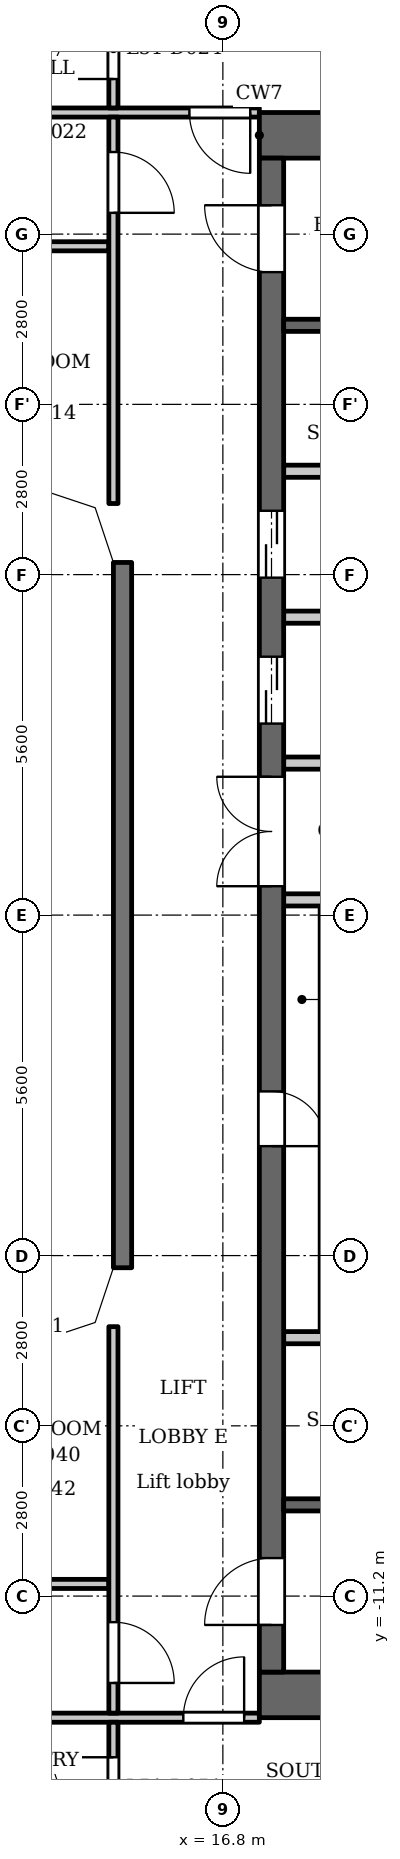
"""IFC4 building model, lengths in metres.
Left out: names, types, materials, properties, quantities, classifications, styles, units other than length and angle.
Written with IfcOpenShell. Run it as: python <this file> out.ifc"""

import sys

from ifc_helpers import new_model, si_unit, direction, frame, frame_2d, origin, place, context, subcontext, project, spatial, polyline, rectangle, outline, extrude, element, fill, save


model = new_model("IFC4")
c1 = context("Model", 3, precision=1e-05, world=origin(), true_north=direction((0.0, 1.0)))
c2 = subcontext(c1, "Body", "Model", "MODEL_VIEW")
j1 = project(units=[si_unit("LENGTHUNIT", "METRE"), si_unit("PLANEANGLEUNIT", "RADIAN")], contexts=[c1])
p1 = place(None, origin())
s1 = spatial("IfcSite", under=j1, at=p1, CompositionType="ELEMENT")
p2 = place(p1, origin())
s2 = spatial("IfcBuilding", under=s1, at=p2, CompositionType="ELEMENT")
p3 = place(p2, frame((0.0, 0.0, 199.4)))
s3 = spatial("IfcBuildingStorey", under=s2, at=p3, CompositionType="ELEMENT", Elevation=199.4)
p4 = place(p3, frame((15.15, 5.8, 0.0), z_axis=(0.0, 0.0, 1.0), x_axis=(0.0, -1.0, 0.0)))
e1 = element("IfcWall", 1, at=p4, inside=s3, PredefinedType="SOLIDWALL", context=c2, shape_type="SweptSolid", body=[
    extrude(rectangle(XDim=11.6, YDim=0.3, at=frame_2d((5.8, 0.0))), origin(), (0.0, 0.0, 1.0), 3.2),
])
for number, where, z_axis, x_axis in (
    (2, (17.4, 12.825, 0.0), (0.0, 0.0, 1.0), (1.0, 0.0, 0.0)),
    (3, (17.4, -12.825, 0.0), (0.0, 0.0, 1.0), (1.0, 0.0, 0.0)),
):
    element("IfcWall", number, at=place(p3, frame(where, z_axis=z_axis, x_axis=x_axis)), inside=s3, PredefinedType="SHEAR", context=c2, shape_type="SweptSolid", body=[
        extrude(rectangle(XDim=7.6, YDim=0.75, at=frame_2d((3.8, 0.0))), origin(), (0.0, 0.0, 1.0), 3.2),
    ])
p5 = place(p3, frame((17.6, -12.45, 0.0), z_axis=(0.0, 0.0, 1.0), x_axis=(0.0, 1.0, 0.0)))
e4 = element("IfcWall", 4, at=p5, inside=s3, PredefinedType="SHEAR", context=c2, shape_type="SweptSolid", body=[
    extrude(rectangle(XDim=24.9, YDim=0.4, at=frame_2d((12.45, 0.0))), origin(), (0.0, 0.0, 1.0), 3.2),
])
p6 = place(p5, frame((8.65, 0.0, 0.0)))
e5 = element("IfcOpeningElement", 5, at=p6, cuts=e4, PredefinedType="OPENING", context=c2, shape_type="SweptSolid", body=[
    extrude(rectangle(XDim=0.9, YDim=2.1, at=frame_2d((0.45, 1.05))), frame((0.0, 0.21, 0.0), z_axis=(0.0, -1.0, 0.0), x_axis=(1.0, 0.0, 0.0)), (0.0, 0.0, 1.0), 0.42),
])
p7 = place(p5, frame((15.6, 0.0, 0.0)))
e6 = element("IfcOpeningElement", 6, at=p7, cuts=e4, PredefinedType="OPENING", context=c2, shape_type="SweptSolid", body=[
    extrude(rectangle(XDim=1.1, YDim=2.1, at=frame_2d((0.55, 1.05))), frame((0.0, 0.21, 0.0), z_axis=(0.0, -1.0, 0.0), x_axis=(1.0, 0.0, 0.0)), (0.0, 0.0, 1.0), 0.42),
])
p8 = place(p5, frame((18.0, 0.0, 0.0)))
e7 = element("IfcOpeningElement", 7, at=p8, cuts=e4, PredefinedType="OPENING", context=c2, shape_type="SweptSolid", body=[
    extrude(rectangle(XDim=1.1, YDim=2.1, at=frame_2d((0.55, 1.05))), frame((0.0, 0.21, 0.0), z_axis=(0.0, -1.0, 0.0), x_axis=(1.0, 0.0, 0.0)), (0.0, 0.0, 1.0), 0.42),
])
p9 = place(p5, frame((23.025, 0.0, 0.0)))
e8 = element("IfcOpeningElement", 8, at=p9, cuts=e4, PredefinedType="OPENING", context=c2, shape_type="SweptSolid", body=[
    extrude(rectangle(XDim=1.1, YDim=2.1, at=frame_2d((0.55, 1.05))), frame((0.0, 0.21, 0.0), z_axis=(0.0, -1.0, 0.0), x_axis=(1.0, 0.0, 0.0)), (0.0, 0.0, 1.0), 0.42),
])
p10 = place(p5, frame((0.775, 0.0, 0.0)))
e9 = element("IfcOpeningElement", 9, at=p10, cuts=e4, PredefinedType="OPENING", context=c2, shape_type="SweptSolid", body=[
    extrude(rectangle(XDim=1.1, YDim=2.1, at=frame_2d((0.55, 1.05))), frame((0.0, 0.21, 0.0), z_axis=(0.0, -1.0, 0.0), x_axis=(1.0, 0.0, 0.0)), (0.0, 0.0, 1.0), 0.42),
])
p11 = place(p5, frame((12.925, 0.0, 0.0)))
e10 = element("IfcOpeningElement", 10, at=p11, cuts=e4, PredefinedType="OPENING", context=c2, shape_type="SweptSolid", body=[
    extrude(rectangle(XDim=1.8, YDim=2.1, at=frame_2d((0.9, 1.05))), frame((0.0, 0.21, 0.0), z_axis=(0.0, -1.0, 0.0), x_axis=(1.0, 0.0, 0.0)), (0.0, 0.0, 1.0), 0.42),
])
p12 = place(p3, frame((17.8, -9.7, 0.0), z_axis=(0.0, 0.0, 1.0), x_axis=(1.0, 0.0, 0.0)))
e11 = element("IfcWall", 11, at=p12, inside=s3, PredefinedType="SHEAR", context=c2, shape_type="SweptSolid", body=[
    extrude(rectangle(XDim=5.65, YDim=0.2, at=frame_2d((2.825, 0.0))), origin(), (0.0, 0.0, 1.0), 3.2),
])
p13 = place(p12, frame((0.85, 0.0, 0.0)))
e12 = element("IfcOpeningElement", 12, at=p13, cuts=e11, PredefinedType="OPENING", context=c2, shape_type="SweptSolid", body=[
    extrude(rectangle(XDim=1.1, YDim=2.1, at=frame_2d((0.55, 1.05))), frame((0.0, 0.11, 0.0), z_axis=(0.0, -1.0, 0.0), x_axis=(1.0, 0.0, 0.0)), (0.0, 0.0, 1.0), 0.22),
])
p14 = place(p12, frame((3.75, 0.0, 0.0)))
e13 = element("IfcOpeningElement", 13, at=p14, cuts=e11, PredefinedType="OPENING", context=c2, shape_type="SweptSolid", body=[
    extrude(rectangle(XDim=1.1, YDim=2.1, at=frame_2d((0.55, 1.05))), frame((0.0, 0.11, 0.0), z_axis=(0.0, -1.0, 0.0), x_axis=(1.0, 0.0, 0.0)), (0.0, 0.0, 1.0), 0.22),
])
p15 = place(p3, frame((17.8, -6.95, 0.0), z_axis=(0.0, 0.0, 1.0), x_axis=(1.0, 0.0, 0.0)))
e14 = element("IfcWall", 14, at=p15, inside=s3, PredefinedType="PARTITIONING", context=c2, shape_type="SweptSolid", body=[
    extrude(rectangle(XDim=2.8, YDim=0.2, at=frame_2d((1.4, 0.0))), origin(), (0.0, 0.0, 1.0), 3.2),
])
p16 = place(p3, frame((17.8, 0.25, 0.0), z_axis=(0.0, 0.0, 1.0), x_axis=(1.0, 0.0, 0.0)))
e15 = element("IfcWall", 15, at=p16, inside=s3, PredefinedType="PARTITIONING", context=c2, shape_type="SweptSolid", body=[
    extrude(rectangle(XDim=3.0, YDim=0.2, at=frame_2d((1.5, 0.0))), origin(), (0.0, 0.0, 1.0), 3.2),
])
p17 = place(p16, frame((1.35, 0.0, 0.0)))
e16 = element("IfcOpeningElement", 16, at=p17, cuts=e15, PredefinedType="OPENING", context=c2, shape_type="SweptSolid", body=[
    extrude(rectangle(XDim=0.9, YDim=2.1, at=frame_2d((0.45, 1.05))), frame((0.0, 0.11, 0.0), z_axis=(0.0, -1.0, 0.0), x_axis=(1.0, 0.0, 0.0)), (0.0, 0.0, 1.0), 0.22),
])
p18 = place(p3, frame((17.8, 2.5, 0.0), z_axis=(0.0, 0.0, 1.0), x_axis=(1.0, 0.0, 0.0)))
e17 = element("IfcWall", 17, at=p18, inside=s3, PredefinedType="PARTITIONING", context=c2, shape_type="SweptSolid", body=[
    extrude(rectangle(XDim=3.0, YDim=0.2, at=frame_2d((1.5, 0.0))), origin(), (0.0, 0.0, 1.0), 3.2),
])
for number, where, z_axis, x_axis in (
    (18, (17.8, 4.9, 0.0), (0.0, 0.0, 1.0), (1.0, 0.0, 0.0)),
    (19, (17.8, 7.3, 0.0), (0.0, 0.0, 1.0), (1.0, 0.0, 0.0)),
):
    element("IfcWall", number, at=place(p3, frame(where, z_axis=z_axis, x_axis=x_axis)), inside=s3, PredefinedType="PARTITIONING", context=c2, shape_type="SweptSolid", body=[
        extrude(rectangle(XDim=2.8, YDim=0.2, at=frame_2d((1.4, 0.0))), origin(), (0.0, 0.0, 1.0), 3.2),
    ])
p19 = place(p3, frame((17.8, 9.7, 0.0), z_axis=(0.0, 0.0, 1.0), x_axis=(1.0, 0.0, 0.0)))
e20 = element("IfcWall", 20, at=p19, inside=s3, PredefinedType="SHEAR", context=c2, shape_type="SweptSolid", body=[
    extrude(rectangle(XDim=5.65, YDim=0.2, at=frame_2d((2.825, 0.0))), origin(), (0.0, 0.0, 1.0), 3.2),
])
p20 = place(p19, frame((0.85, 0.0, 0.0)))
e21 = element("IfcOpeningElement", 21, at=p20, cuts=e20, PredefinedType="OPENING", context=c2, shape_type="SweptSolid", body=[
    extrude(rectangle(XDim=1.1, YDim=2.1, at=frame_2d((0.55, 1.05))), frame((0.0, 0.11, 0.0), z_axis=(0.0, -1.0, 0.0), x_axis=(1.0, 0.0, 0.0)), (0.0, 0.0, 1.0), 0.22),
])
p21 = place(p19, frame((3.75, 0.0, 0.0)))
e22 = element("IfcOpeningElement", 22, at=p21, cuts=e20, PredefinedType="OPENING", context=c2, shape_type="SweptSolid", body=[
    extrude(rectangle(XDim=1.1, YDim=2.1, at=frame_2d((0.55, 1.05))), frame((0.0, 0.11, 0.0), z_axis=(0.0, -1.0, 0.0), x_axis=(1.0, 0.0, 0.0)), (0.0, 0.0, 1.0), 0.22),
])
p22 = place(p3, frame((-17.4, -13.2, 0.0), z_axis=(0.0, 0.0, 1.0), x_axis=(1.0, 0.0, 0.0)))
e23 = element("IfcWall", 23, at=p22, inside=s3, PredefinedType="PARTITIONING", context=c2, shape_type="SweptSolid", body=[
    extrude(rectangle(XDim=34.8, YDim=0.15, at=frame_2d((17.4, 0.0))), origin(), (0.0, 0.0, 1.0), 3.2),
])
p23 = place(p22, frame((0.15, 0.0, 0.0)))
e24 = element("IfcOpeningElement", 24, at=p23, cuts=e23, PredefinedType="OPENING", context=c2, shape_type="SweptSolid", body=[
    extrude(rectangle(XDim=1.0, YDim=2.1, at=frame_2d((0.5, 1.05))), frame((0.0, 0.085, 0.0), z_axis=(0.0, -1.0, 0.0), x_axis=(1.0, 0.0, 0.0)), (0.0, 0.0, 1.0), 0.17),
])
p24 = place(p22, frame((33.55, 0.0, 0.0)))
e25 = element("IfcOpeningElement", 25, at=p24, cuts=e23, PredefinedType="OPENING", context=c2, shape_type="SweptSolid", body=[
    extrude(rectangle(XDim=1.0, YDim=2.1, at=frame_2d((0.5, 1.05))), frame((0.0, 0.085, 0.0), z_axis=(0.0, -1.0, 0.0), x_axis=(1.0, 0.0, 0.0)), (0.0, 0.0, 1.0), 0.17),
])
p25 = place(p3, frame((-14.925, -11.0, 0.0), z_axis=(0.0, 0.0, 1.0), x_axis=(1.0, 0.0, 0.0)))
e26 = element("IfcWall", 26, at=p25, inside=s3, PredefinedType="PARTITIONING", context=c2, shape_type="SweptSolid", body=[
    extrude(rectangle(XDim=29.85, YDim=0.15, at=frame_2d((14.925, 0.0))), origin(), (0.0, 0.0, 1.0), 3.2),
])
p26 = place(p25, frame((2.575, 0.0, 0.0)))
e27 = element("IfcOpeningElement", 27, at=p26, cuts=e26, PredefinedType="OPENING", context=c2, shape_type="SweptSolid", body=[
    extrude(rectangle(XDim=1.0, YDim=2.1, at=frame_2d((0.5, 1.05))), frame((0.0, 0.085, 0.0), z_axis=(0.0, -1.0, 0.0), x_axis=(1.0, 0.0, 0.0)), (0.0, 0.0, 1.0), 0.17),
])
p27 = place(p25, frame((26.375, 0.0, 0.0)))
e28 = element("IfcOpeningElement", 28, at=p27, cuts=e26, PredefinedType="OPENING", context=c2, shape_type="SweptSolid", body=[
    extrude(rectangle(XDim=1.0, YDim=2.1, at=frame_2d((0.5, 1.05))), frame((0.0, 0.085, 0.0), z_axis=(0.0, -1.0, 0.0), x_axis=(1.0, 0.0, 0.0)), (0.0, 0.0, 1.0), 0.17),
])
p28 = place(p3, frame((-14.925, 11.0, 0.0), z_axis=(0.0, 0.0, 1.0), x_axis=(1.0, 0.0, 0.0)))
e29 = element("IfcWall", 29, at=p28, inside=s3, PredefinedType="PARTITIONING", context=c2, shape_type="SweptSolid", body=[
    extrude(rectangle(XDim=29.85, YDim=0.15, at=frame_2d((14.925, 0.0))), origin(), (0.0, 0.0, 1.0), 3.2),
])
p29 = place(p28, frame((2.475, 0.0, 0.0)))
e30 = element("IfcOpeningElement", 30, at=p29, cuts=e29, PredefinedType="OPENING", context=c2, shape_type="SweptSolid", body=[
    extrude(rectangle(XDim=1.0, YDim=2.1, at=frame_2d((0.5, 1.05))), frame((0.0, 0.085, 0.0), z_axis=(0.0, -1.0, 0.0), x_axis=(1.0, 0.0, 0.0)), (0.0, 0.0, 1.0), 0.17),
])
p30 = place(p28, frame((17.975, 0.0, 0.0)))
e31 = element("IfcOpeningElement", 31, at=p30, cuts=e29, PredefinedType="OPENING", context=c2, shape_type="SweptSolid", body=[
    extrude(rectangle(XDim=1.0, YDim=2.1, at=frame_2d((0.5, 1.05))), frame((0.0, 0.085, 0.0), z_axis=(0.0, -1.0, 0.0), x_axis=(1.0, 0.0, 0.0)), (0.0, 0.0, 1.0), 0.17),
])
p31 = place(p3, frame((-17.4, 13.2, 0.0), z_axis=(0.0, 0.0, 1.0), x_axis=(1.0, 0.0, 0.0)))
e32 = element("IfcWall", 32, at=p31, inside=s3, PredefinedType="PARTITIONING", context=c2, shape_type="SweptSolid", body=[
    extrude(rectangle(XDim=34.8, YDim=0.15, at=frame_2d((17.4, 0.0))), origin(), (0.0, 0.0, 1.0), 3.2),
])
p32 = place(p31, frame((0.25, 0.0, 0.0)))
e33 = element("IfcOpeningElement", 33, at=p32, cuts=e32, PredefinedType="OPENING", context=c2, shape_type="SweptSolid", body=[
    extrude(rectangle(XDim=1.0, YDim=2.1, at=frame_2d((0.5, 1.05))), frame((0.0, 0.085, 0.0), z_axis=(0.0, -1.0, 0.0), x_axis=(1.0, 0.0, 0.0)), (0.0, 0.0, 1.0), 0.17),
])
p33 = place(p31, frame((33.65, 0.0, 0.0)))
e34 = element("IfcOpeningElement", 34, at=p33, cuts=e32, PredefinedType="OPENING", context=c2, shape_type="SweptSolid", body=[
    extrude(rectangle(XDim=1.0, YDim=2.1, at=frame_2d((0.5, 1.05))), frame((0.0, 0.085, 0.0), z_axis=(0.0, -1.0, 0.0), x_axis=(1.0, 0.0, 0.0)), (0.0, 0.0, 1.0), 0.17),
])
p34 = place(p3, frame((15.0, -15.325, 0.0), z_axis=(0.0, 0.0, 1.0), x_axis=(0.0, 1.0, 0.0)))
e35 = element("IfcWall", 35, at=p34, inside=s3, PredefinedType="PARTITIONING", context=c2, shape_type="SweptSolid", body=[
    extrude(rectangle(XDim=2.05, YDim=0.15, at=frame_2d((1.025, 0.0))), origin(), (0.0, 0.0, 1.0), 3.2),
])
p35 = place(p34, frame((0.474, 0.0, 0.0)))
e36 = element("IfcOpeningElement", 36, at=p35, cuts=e35, PredefinedType="OPENING", context=c2, shape_type="SweptSolid", body=[
    extrude(rectangle(XDim=1.0, YDim=2.1, at=frame_2d((0.5, 1.05))), frame((0.0, 0.085, 0.0), z_axis=(0.0, -1.0, 0.0), x_axis=(1.0, 0.0, 0.0)), (0.0, 0.0, 1.0), 0.17),
])
p36 = place(p3, frame((15.0, -13.125, 0.0), z_axis=(0.0, 0.0, 1.0), x_axis=(0.0, 1.0, 0.0)))
e37 = element("IfcWall", 37, at=p36, inside=s3, PredefinedType="PARTITIONING", context=c2, shape_type="SweptSolid", body=[
    extrude(rectangle(XDim=6.356, YDim=0.15, at=frame_2d((3.178, 0.0))), origin(), (0.0, 0.0, 1.0), 3.2),
])
p37 = place(p36, frame((0.496, 0.0, 0.0)))
e38 = element("IfcOpeningElement", 38, at=p37, cuts=e37, PredefinedType="OPENING", context=c2, shape_type="SweptSolid", body=[
    extrude(rectangle(XDim=1.0, YDim=2.1, at=frame_2d((0.5, 1.05))), frame((0.0, 0.085, 0.0), z_axis=(0.0, -1.0, 0.0), x_axis=(1.0, 0.0, 0.0)), (0.0, 0.0, 1.0), 0.17),
])
p38 = place(p3, frame((15.0, 6.769, 0.0), z_axis=(0.0, 0.0, 1.0), x_axis=(0.0, 1.0, 0.0)))
e39 = element("IfcWall", 39, at=p38, inside=s3, PredefinedType="PARTITIONING", context=c2, shape_type="SweptSolid", body=[
    extrude(rectangle(XDim=6.356, YDim=0.15, at=frame_2d((3.178, 0.0))), origin(), (0.0, 0.0, 1.0), 3.2),
])
p39 = place(p38, frame((4.781, 0.0, 0.0)))
e40 = element("IfcOpeningElement", 40, at=p39, cuts=e39, PredefinedType="OPENING", context=c2, shape_type="SweptSolid", body=[
    extrude(rectangle(XDim=1.0, YDim=2.1, at=frame_2d((0.5, 1.05))), frame((0.0, 0.085, 0.0), z_axis=(0.0, -1.0, 0.0), x_axis=(1.0, 0.0, 0.0)), (0.0, 0.0, 1.0), 0.17),
])
p40 = place(p3, frame((15.0, 13.275, 0.0), z_axis=(0.0, 0.0, 1.0), x_axis=(0.0, 1.0, 0.0)))
e41 = element("IfcWall", 41, at=p40, inside=s3, PredefinedType="PARTITIONING", context=c2, shape_type="SweptSolid", body=[
    extrude(rectangle(XDim=2.05, YDim=0.15, at=frame_2d((1.025, 0.0))), origin(), (0.0, 0.0, 1.0), 3.2),
])
p41 = place(p40, frame((0.476, 0.0, 0.0)))
e42 = element("IfcOpeningElement", 42, at=p41, cuts=e41, PredefinedType="OPENING", context=c2, shape_type="SweptSolid", body=[
    extrude(rectangle(XDim=1.0, YDim=2.1, at=frame_2d((0.5, 1.05))), frame((0.0, 0.085, 0.0), z_axis=(0.0, -1.0, 0.0), x_axis=(1.0, 0.0, 0.0)), (0.0, 0.0, 1.0), 0.17),
])
p42 = place(p3, origin())
e43 = element("IfcWall", 43, at=p42, inside=s3, PredefinedType="SOLIDWALL", context=c2, shape_type="SweptSolid", body=[
    extrude(outline(polyline([(14.937, 6.937), (13.849, 7.3), (13.8, 7.3), (13.8, 7.0), (14.7, 6.7), (15.0, 5.8), (15.3, 5.8), (15.3, 5.849), (14.937, 6.937)])), origin(), (0.0, 0.0, 1.0), 3.2),
])
e44 = element("IfcWall", 44, at=p42, inside=s3, PredefinedType="SOLIDWALL", context=c2, shape_type="SweptSolid", body=[
    extrude(outline(polyline([(14.937, -6.937), (15.3, -5.849), (15.3, -5.8), (15.0, -5.8), (14.7, -6.7), (13.8, -7.0), (13.8, -7.3), (13.849, -7.3), (14.937, -6.937)])), origin(), (0.0, 0.0, 1.0), 3.2),
])
p43 = place(p6, origin())
e45 = element("IfcDoor", 45, at=p43, inside=s3, OperationType="SINGLE_SWING_LEFT", PredefinedType="DOOR", context=c2, shape_type="SweptSolid", body=[
    extrude(rectangle(XDim=0.9, YDim=2.1, at=frame_2d((0.45, 1.05))), frame((0.0, 0.025, 0.0), z_axis=(0.0, -1.0, 0.0), x_axis=(1.0, 0.0, 0.0)), (0.0, 0.0, 1.0), 0.05),
])
fill(e5, e45)
p44 = place(p7, origin())
e46 = element("IfcDoor", 46, at=p44, inside=s3, OperationType="DOUBLE_DOOR_SLIDING", PredefinedType="DOOR", context=c2, shape_type="SweptSolid", body=[
    extrude(rectangle(XDim=1.1, YDim=2.1, at=frame_2d((0.55, 1.05))), frame((0.0, 0.025, 0.0), z_axis=(0.0, -1.0, 0.0), x_axis=(1.0, 0.0, 0.0)), (0.0, 0.0, 1.0), 0.05),
])
fill(e6, e46)
p45 = place(p8, origin())
e47 = element("IfcDoor", 47, at=p45, inside=s3, OperationType="DOUBLE_DOOR_SLIDING", PredefinedType="DOOR", context=c2, shape_type="SweptSolid", body=[
    extrude(rectangle(XDim=1.1, YDim=2.1, at=frame_2d((0.55, 1.05))), frame((0.0, 0.025, 0.0), z_axis=(0.0, -1.0, 0.0), x_axis=(1.0, 0.0, 0.0)), (0.0, 0.0, 1.0), 0.05),
])
fill(e7, e47)
p46 = place(p9, origin())
e48 = element("IfcDoor", 48, at=p46, inside=s3, OperationType="SINGLE_SWING_LEFT", PredefinedType="DOOR", context=c2, shape_type="SweptSolid", body=[
    extrude(rectangle(XDim=1.1, YDim=2.1, at=frame_2d((0.55, 1.05))), frame((0.0, 0.025, 0.0), z_axis=(0.0, -1.0, 0.0), x_axis=(1.0, 0.0, 0.0)), (0.0, 0.0, 1.0), 0.05),
])
fill(e8, e48)
p47 = place(p10, origin())
e49 = element("IfcDoor", 49, at=p47, inside=s3, OperationType="SINGLE_SWING_RIGHT", PredefinedType="DOOR", context=c2, shape_type="SweptSolid", body=[
    extrude(rectangle(XDim=1.1, YDim=2.1, at=frame_2d((0.55, 1.05))), frame((0.0, 0.025, 0.0), z_axis=(0.0, -1.0, 0.0), x_axis=(1.0, 0.0, 0.0)), (0.0, 0.0, 1.0), 0.05),
])
fill(e9, e49)
p48 = place(p11, origin())
e50 = element("IfcDoor", 50, at=p48, inside=s3, OperationType="DOUBLE_DOOR_SINGLE_SWING", PredefinedType="DOOR", context=c2, shape_type="SweptSolid", body=[
    extrude(rectangle(XDim=1.8, YDim=2.1, at=frame_2d((0.9, 1.05))), frame((0.0, 0.025, 0.0), z_axis=(0.0, -1.0, 0.0), x_axis=(1.0, 0.0, 0.0)), (0.0, 0.0, 1.0), 0.05),
])
fill(e10, e50)
p49 = place(p39, origin())
e51 = element("IfcDoor", 51, at=p49, inside=s3, OperationType="SINGLE_SWING_LEFT", PredefinedType="DOOR", context=c2, shape_type="SweptSolid", body=[
    extrude(rectangle(XDim=1.0, YDim=2.1, at=frame_2d((0.5, 1.05))), frame((0.0, 0.025, 0.0), z_axis=(0.0, -1.0, 0.0), x_axis=(1.0, 0.0, 0.0)), (0.0, 0.0, 1.0), 0.05),
])
fill(e40, e51)
p50 = place(p33, origin())
e52 = element("IfcDoor", 52, at=p50, inside=s3, OperationType="SINGLE_SWING_RIGHT", PredefinedType="DOOR", context=c2, shape_type="SweptSolid", body=[
    extrude(rectangle(XDim=1.0, YDim=2.1, at=frame_2d((0.5, 1.05))), frame((0.0, 0.025, 0.0), z_axis=(0.0, -1.0, 0.0), x_axis=(1.0, 0.0, 0.0)), (0.0, 0.0, 1.0), 0.05),
])
fill(e34, e52)
p51 = place(p37, origin())
e53 = element("IfcDoor", 53, at=p51, inside=s3, OperationType="SINGLE_SWING_LEFT", PredefinedType="DOOR", context=c2, shape_type="SweptSolid", body=[
    extrude(rectangle(XDim=1.0, YDim=2.1, at=frame_2d((0.5, 1.05))), frame((0.0, 0.025, 0.0), z_axis=(0.0, -1.0, 0.0), x_axis=(1.0, 0.0, 0.0)), (0.0, 0.0, 1.0), 0.05),
])
fill(e38, e53)
p52 = place(p24, origin())
e54 = element("IfcDoor", 54, at=p52, inside=s3, OperationType="SINGLE_SWING_LEFT", PredefinedType="DOOR", context=c2, shape_type="SweptSolid", body=[
    extrude(rectangle(XDim=1.0, YDim=2.1, at=frame_2d((0.5, 1.05))), frame((0.0, 0.025, 0.0), z_axis=(0.0, -1.0, 0.0), x_axis=(1.0, 0.0, 0.0)), (0.0, 0.0, 1.0), 0.05),
])
fill(e25, e54)
p53 = place(p41, origin())
e55 = element("IfcDoor", 55, at=p53, inside=s3, OperationType="SINGLE_SWING_RIGHT", PredefinedType="DOOR", context=c2, shape_type="SweptSolid", body=[
    extrude(rectangle(XDim=1.0, YDim=2.1, at=frame_2d((0.5, 1.05))), frame((0.0, 0.025, 0.0), z_axis=(0.0, -1.0, 0.0), x_axis=(1.0, 0.0, 0.0)), (0.0, 0.0, 1.0), 0.05),
])
fill(e42, e55)
p54 = place(p35, origin())
e56 = element("IfcDoor", 56, at=p54, inside=s3, OperationType="SINGLE_SWING_LEFT", PredefinedType="DOOR", context=c2, shape_type="SweptSolid", body=[
    extrude(rectangle(XDim=1.0, YDim=2.1, at=frame_2d((0.5, 1.05))), frame((0.0, 0.025, 0.0), z_axis=(0.0, -1.0, 0.0), x_axis=(1.0, 0.0, 0.0)), (0.0, 0.0, 1.0), 0.05),
])
fill(e36, e56)
save(model, sys.argv[1])
